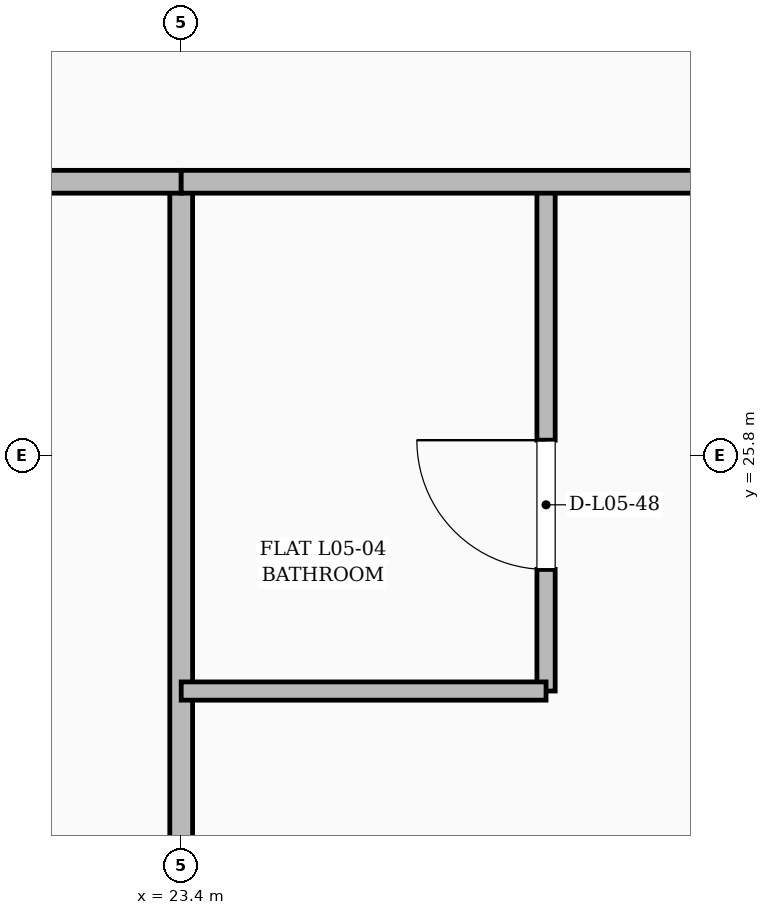
"""IFC4 building model, lengths in metres.
Left out: names, types, materials, properties, quantities, classifications, styles, units other than length and angle.
Written with IfcOpenShell. Run it as: python <this file> out.ifc"""

import sys

from ifc_helpers import new_model, si_unit, direction, frame, frame_2d, origin, place, context, subcontext, project, spatial, rectangle, extrude, source, transform, mapped, element, fill, save


model = new_model("IFC4")
c1 = context("Model", 3, precision=1e-05, world=origin(), true_north=direction((0.0, 1.0)))
c2 = subcontext(c1, "Body", "Model", "MODEL_VIEW")
j1 = project(units=[si_unit("LENGTHUNIT", "METRE"), si_unit("PLANEANGLEUNIT", "RADIAN")], contexts=[c1])
p1 = place(None, origin())
s1 = spatial("IfcSite", under=j1, at=p1, CompositionType="ELEMENT")
p2 = place(p1, origin())
s2 = spatial("IfcBuilding", under=s1, at=p2, CompositionType="ELEMENT")
p3 = place(p2, frame((0.0, 0.0, 23.5)))
s3 = spatial("IfcBuildingStorey", under=s2, at=p3, CompositionType="ELEMENT", Elevation=23.5)
p4 = place(p3, frame((23.4, 3.145, 0.0), z_axis=(0.0, 0.0, 1.0), x_axis=(0.0, 1.0, 0.0)))
e1 = element("IfcWall", 1, at=p4, inside=s3, PredefinedType="PARTITIONING", context=c2, shape_type="SweptSolid", body=[
    extrude(rectangle(XDim=24.455, YDim=0.15, at=frame_2d((12.228, 0.0))), origin(), (0.0, 0.0, 1.0), 2.752),
])
p5 = place(p3, frame((15.6, 27.6, 0.0), z_axis=(0.0, 0.0, 1.0), x_axis=(1.0, 0.0, 0.0)))
e2 = element("IfcWall", 2, at=p5, inside=s3, PredefinedType="PARTITIONING", context=c2, shape_type="SweptSolid", body=[
    extrude(rectangle(XDim=7.8, YDim=0.15, at=frame_2d((3.9, 0.0))), origin(), (0.0, 0.0, 1.0), 2.752),
])
p6 = place(p5, frame((5.172, 0.0, 0.0)))
e3 = element("IfcOpeningElement", 3, at=p6, cuts=e2, PredefinedType="OPENING", context=c2, shape_type="SweptSolid", body=[
    extrude(rectangle(XDim=0.95, YDim=2.15, at=frame_2d((0.475, 1.075))), frame((0.0, 0.085, 0.0), z_axis=(0.0, -1.0, 0.0), x_axis=(1.0, 0.0, 0.0)), (0.0, 0.0, 1.0), 0.17),
])
p7 = place(p3, frame((25.8, 24.25, 0.0), z_axis=(0.0, 0.0, 1.0), x_axis=(0.0, 1.0, 0.0)))
e4 = element("IfcWall", 4, at=p7, inside=s3, PredefinedType="PARTITIONING", context=c2, shape_type="SweptSolid", body=[
    extrude(rectangle(XDim=3.35, YDim=0.12, at=frame_2d((1.675, 0.0))), origin(), (0.0, 0.0, 1.0), 2.94),
])
p8 = place(p7, frame((0.8, 0.0, 0.0)))
e5 = element("IfcOpeningElement", 5, at=p8, cuts=e4, PredefinedType="OPENING", context=c2, shape_type="SweptSolid", body=[
    extrude(rectangle(XDim=0.85, YDim=2.1, at=frame_2d((0.425, 1.05))), frame((0.0, 0.07, 0.0), z_axis=(0.0, -1.0, 0.0), x_axis=(1.0, 0.0, 0.0)), (0.0, 0.0, 1.0), 0.14),
])
p9 = place(p3, frame((23.4, 24.25, 0.0), z_axis=(0.0, 0.0, 1.0), x_axis=(1.0, 0.0, 0.0)))
e6 = element("IfcWall", 6, at=p9, inside=s3, PredefinedType="PARTITIONING", context=c2, shape_type="SweptSolid", body=[
    extrude(rectangle(XDim=2.4, YDim=0.12, at=frame_2d((1.2, 0.0))), origin(), (0.0, 0.0, 1.0), 2.752),
])
p10 = place(p3, frame((23.4, 27.6, 0.0), z_axis=(0.0, 0.0, 1.0), x_axis=(1.0, 0.0, 0.0)))
e7 = element("IfcWall", 7, at=p10, inside=s3, PredefinedType="PARTITIONING", context=c2, shape_type="SweptSolid", body=[
    extrude(rectangle(XDim=7.2, YDim=0.15, at=frame_2d((3.6, 0.0))), origin(), (0.0, 0.0, 1.0), 2.752),
])
p11 = place(p10, frame((4.706, 0.0, 0.0)))
e8 = element("IfcOpeningElement", 8, at=p11, cuts=e7, PredefinedType="OPENING", context=c2, shape_type="SweptSolid", body=[
    extrude(rectangle(XDim=0.95, YDim=2.15, at=frame_2d((0.475, 1.075))), frame((0.0, 0.085, 0.0), z_axis=(0.0, -1.0, 0.0), x_axis=(1.0, 0.0, 0.0)), (0.0, 0.0, 1.0), 0.17),
])
m1 = source(origin(), c2, "Body", "SweptSolid", [
    extrude(rectangle(XDim=0.85, YDim=2.1, at=frame_2d((0.425, 1.05))), frame((0.0, 0.025, 0.0), z_axis=(0.0, -1.0, 0.0), x_axis=(1.0, 0.0, 0.0)), (0.0, 0.0, 1.0), 0.05),
])
p12 = place(p8, origin())
e9 = element("IfcDoor", 9, at=p12, inside=s3, OperationType="SINGLE_SWING_RIGHT", PredefinedType="DOOR", context=c2, shape_type="MappedRepresentation", body=[
    mapped(m1, transform((0.0, 0.0, 0.0), x_axis=(1.0, 0.0, 0.0), y_axis=(0.0, 1.0, 0.0), z_axis=(0.0, 0.0, 1.0), scale=1.0)),
])
fill(e5, e9)
save(model, sys.argv[1])
